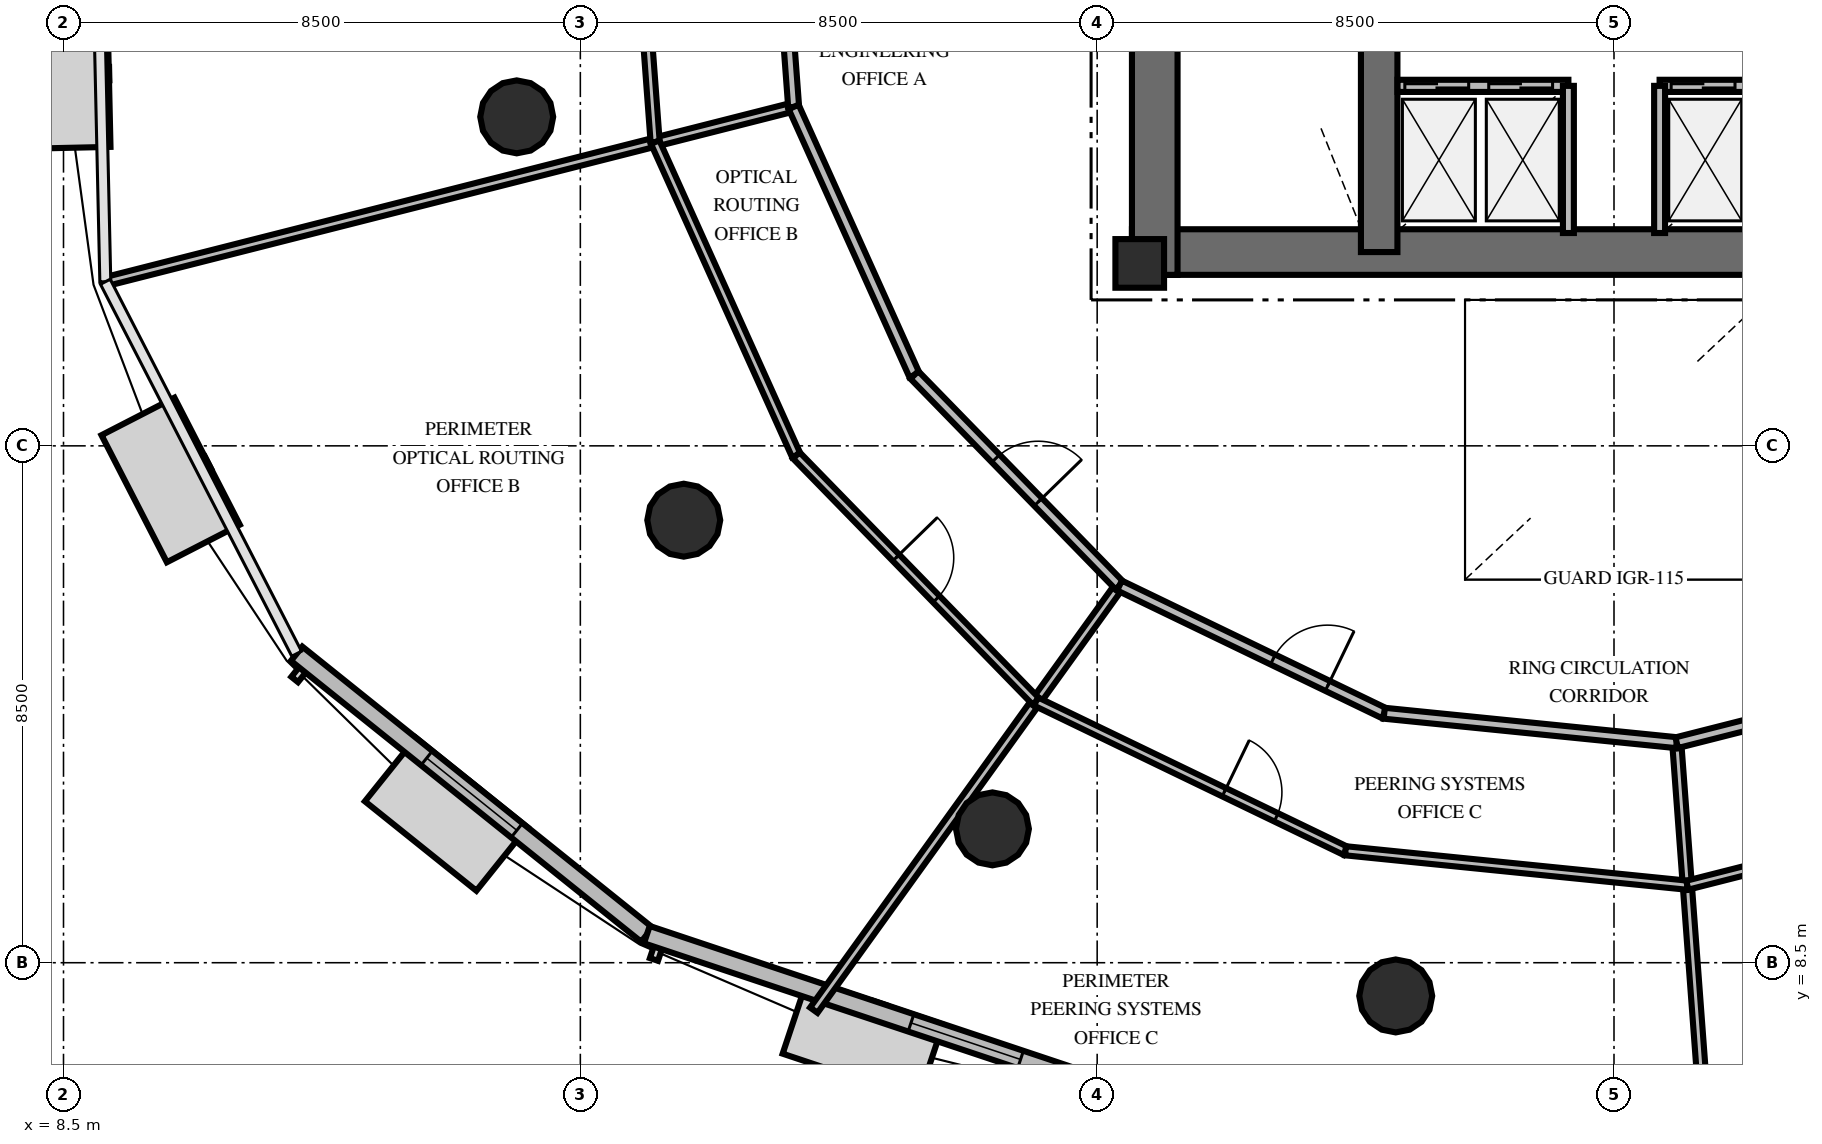
"""IFC4 building model, lengths in metres.
Left out: names, types, materials, properties, quantities, classifications, styles, units other than length and angle.
Written with IfcOpenShell. Run it as: python <this file> out.ifc"""

import sys

from ifc_helpers import new_model, si_unit, direction, frame, frame_2d, origin, origin_2d, place, context, subcontext, project, spatial, rectangle, circle, extrude, element, fill, save


model = new_model("IFC4")
c1 = context("Model", 3, precision=1e-05, world=origin(), true_north=direction((0.0, 1.0)))
c2 = subcontext(c1, "Body", "Model", "MODEL_VIEW")
j1 = project(units=[si_unit("LENGTHUNIT", "METRE"), si_unit("PLANEANGLEUNIT", "RADIAN")], contexts=[c1])
p1 = place(None, origin())
s1 = spatial("IfcSite", under=j1, at=p1, CompositionType="ELEMENT")
p2 = place(p1, origin())
s2 = spatial("IfcBuilding", under=s1, at=p2, CompositionType="ELEMENT")
p3 = place(p2, frame((0.0, 0.0, 93.8)))
s3 = spatial("IfcBuildingStorey", under=s2, at=p3, CompositionType="ELEMENT", Elevation=93.8)
p4 = place(p3, frame((26.072, 20.187, 0.0), z_axis=(0.0, 0.0, 1.0), x_axis=(1.0, 0.0, 0.0)))
e1 = element("IfcWall", 1, at=p4, inside=s3, PredefinedType="SHEAR", context=c2, shape_type="SweptSolid", body=[
    extrude(rectangle(XDim=15.866, YDim=0.75, at=frame_2d((7.933, 0.0))), origin(), (0.0, 0.0, 1.0), 4.0),
])
p5 = place(p3, frame((26.447, 19.812, 0.0), z_axis=(0.0, 0.0, 1.0), x_axis=(0.0, 1.0, 0.0)))
e2 = element("IfcWall", 2, at=p5, inside=s3, PredefinedType="SHEAR", context=c2, shape_type="SweptSolid", body=[
    extrude(rectangle(XDim=10.576, YDim=0.75, at=frame_2d((5.288, 0.0))), origin(), (0.0, 0.0, 1.0), 4.0),
])
p6 = place(p3, frame((30.138, 20.187, 0.0), z_axis=(0.0, 0.0, 1.0), x_axis=(0.0, 1.0, 0.0)))
e3 = element("IfcWall", 3, at=p6, inside=s3, PredefinedType="SHEAR", context=c2, shape_type="SweptSolid", body=[
    extrude(rectangle(XDim=9.826, YDim=0.6, at=frame_2d((4.913, 0.0))), origin(), (0.0, 0.0, 1.0), 4.0),
])
p7 = place(p3, frame((26.2, 20.0, 0.0), z_axis=(0.0, 0.0, 1.0), x_axis=(1.0, 0.0, 0.0)))
e4 = element("IfcColumn", 4, at=p7, inside=s3, PredefinedType="PILASTER", context=c2, shape_type="SweptSolid", body=[
    extrude(rectangle(XDim=0.8, YDim=0.8, at=origin_2d()), origin(), (0.0, 0.0, 1.0), 4.0),
])
for number, where, z_axis, x_axis in (
    (5, (15.954, 22.41, -0.28), (0.0, 0.0, 1.0), (1.0, 0.0, 0.0)),
    (6, (18.701, 15.778, -0.28), (0.0, 0.0, 1.0), (1.0, 0.0, 0.0)),
    (7, (23.778, 10.701, -0.28), (0.0, 0.0, 1.0), (1.0, 0.0, 0.0)),
    (8, (30.41, 7.954, -0.28), (0.0, 0.0, 1.0), (1.0, 0.0, 0.0)),
):
    element("IfcColumn", number, at=place(p3, frame(where, z_axis=z_axis, x_axis=x_axis)), inside=s3, PredefinedType="COLUMN", context=c2, shape_type="SweptSolid", body=[
        extrude(circle(Radius=0.6, at=origin_2d()), origin(), (0.0, 0.0, 1.0), 4.28),
    ])
p8 = place(p3, frame((12.334, 13.581, 0.0), z_axis=(0.0, 0.0, 1.0), x_axis=(0.780103663784, -0.625650280708, 0.0)))
e9 = element("IfcWall", 9, at=p8, inside=s3, PredefinedType="SOLIDWALL", context=c2, shape_type="SweptSolid", body=[
    extrude(rectangle(XDim=7.383, YDim=0.3, at=frame_2d((3.692, 0.0))), origin(), (0.0, 0.0, 1.0), 2.9),
])
p9 = place(p8, frame((2.742, 0.0, 0.8)))
e10 = element("IfcOpeningElement", 10, at=p9, cuts=e9, PredefinedType="OPENING", context=c2, shape_type="SweptSolid", body=[
    extrude(rectangle(XDim=1.9, YDim=1.95, at=frame_2d((0.95, 0.975))), frame((0.0, 0.16, 0.0), z_axis=(0.0, -1.0, 0.0), x_axis=(1.0, 0.0, 0.0)), (0.0, 0.0, 1.0), 0.32),
])
p10 = place(p3, frame((18.094, 8.962, 0.0), z_axis=(0.0, 0.0, 1.0), x_axis=(0.948496147273, -0.316788665531, 0.0)))
e11 = element("IfcWall", 11, at=p10, inside=s3, PredefinedType="SOLIDWALL", context=c2, shape_type="SweptSolid", body=[
    extrude(rectangle(XDim=8.095, YDim=0.3, at=frame_2d((4.048, 0.0))), origin(), (0.0, 0.0, 1.0), 2.9),
])
p11 = place(p10, frame((4.58, 0.0, 0.8)))
e12 = element("IfcOpeningElement", 12, at=p11, cuts=e11, PredefinedType="OPENING", context=c2, shape_type="SweptSolid", body=[
    extrude(rectangle(XDim=1.9, YDim=1.95, at=frame_2d((0.95, 0.975))), frame((0.0, 0.16, 0.0), z_axis=(0.0, -1.0, 0.0), x_axis=(1.0, 0.0, 0.0)), (0.0, 0.0, 1.0), 0.32),
])
p12 = place(p3, frame((34.443, 6.198, 0.0), z_axis=(0.0, 0.0, 1.0), x_axis=(0.969231185193, 0.246152208297, 0.0)))
e13 = element("IfcWall", 13, at=p12, inside=s3, PredefinedType="SOLIDWALL", context=c2, shape_type="SweptSolid", body=[
    extrude(rectangle(XDim=8.891, YDim=0.3, at=frame_2d((4.445, 0.0))), origin(), (0.0, 0.0, 1.0), 2.9),
])
p13 = place(p12, frame((6.75, 0.0, 0.0)))
e14 = element("IfcOpeningElement", 14, at=p13, cuts=e13, PredefinedType="OPENING", context=c2, shape_type="SweptSolid", body=[
    extrude(rectangle(XDim=1.05, YDim=2.15, at=frame_2d((0.525, 1.075))), frame((0.0, 0.16, 0.0), z_axis=(0.0, -1.0, 0.0), x_axis=(1.0, 0.0, 0.0)), (0.0, 0.0, 1.0), 0.32),
])
p14 = place(p3, frame((30.44, 22.92, 0.0), z_axis=(0.0, 0.0, 1.0), x_axis=(1.0, 0.0, 0.0)))
e15 = element("IfcWall", 15, at=p14, inside=s3, PredefinedType="SOLIDWALL", context=c2, shape_type="SweptSolid", body=[
    extrude(rectangle(XDim=2.81, YDim=0.2, at=frame_2d((1.405, 0.0))), origin(), (0.0, 0.0, 1.0), 2.8),
])
p15 = place(p14, frame((0.12, 0.0, 0.0)))
e16 = element("IfcOpeningElement", 16, at=p15, cuts=e15, PredefinedType="OPENING", context=c2, shape_type="SweptSolid", body=[
    extrude(rectangle(XDim=1.05, YDim=2.1, at=frame_2d((0.525, 1.05))), frame((0.0, 0.11, 0.0), z_axis=(0.0, -1.0, 0.0), x_axis=(1.0, 0.0, 0.0)), (0.0, 0.0, 1.0), 0.22),
])
p16 = place(p14, frame((1.5, 0.0, 0.0)))
e17 = element("IfcOpeningElement", 17, at=p16, cuts=e15, PredefinedType="OPENING", context=c2, shape_type="SweptSolid", body=[
    extrude(rectangle(XDim=1.05, YDim=2.1, at=frame_2d((0.525, 1.05))), frame((0.0, 0.11, 0.0), z_axis=(0.0, -1.0, 0.0), x_axis=(1.0, 0.0, 0.0)), (0.0, 0.0, 1.0), 0.22),
])
p17 = place(p3, frame((33.25, 20.5, 0.0), z_axis=(0.0, 0.0, 1.0), x_axis=(0.0, 1.0, 0.0)))
e18 = element("IfcWall", 18, at=p17, inside=s3, PredefinedType="SOLIDWALL", context=c2, shape_type="SweptSolid", body=[
    extrude(rectangle(XDim=2.42, YDim=0.18, at=frame_2d((1.21, 0.0))), origin(), (0.0, 0.0, 1.0), 2.8),
])
p18 = place(p3, frame((34.75, 22.92, 0.0), z_axis=(0.0, 0.0, 1.0), x_axis=(1.0, 0.0, 0.0)))
e19 = element("IfcWall", 19, at=p18, inside=s3, PredefinedType="SOLIDWALL", context=c2, shape_type="SweptSolid", body=[
    extrude(rectangle(XDim=2.81, YDim=0.2, at=frame_2d((1.405, 0.0))), origin(), (0.0, 0.0, 1.0), 2.8),
])
p19 = place(p18, frame((0.19, 0.0, 0.0)))
e20 = element("IfcOpeningElement", 20, at=p19, cuts=e19, PredefinedType="OPENING", context=c2, shape_type="SweptSolid", body=[
    extrude(rectangle(XDim=1.05, YDim=2.1, at=frame_2d((0.525, 1.05))), frame((0.0, 0.11, 0.0), z_axis=(0.0, -1.0, 0.0), x_axis=(1.0, 0.0, 0.0)), (0.0, 0.0, 1.0), 0.22),
])
p20 = place(p18, frame((1.57, 0.0, 0.0)))
e21 = element("IfcOpeningElement", 21, at=p20, cuts=e19, PredefinedType="OPENING", context=c2, shape_type="SweptSolid", body=[
    extrude(rectangle(XDim=1.05, YDim=2.1, at=frame_2d((0.525, 1.05))), frame((0.0, 0.11, 0.0), z_axis=(0.0, -1.0, 0.0), x_axis=(1.0, 0.0, 0.0)), (0.0, 0.0, 1.0), 0.22),
])
p21 = place(p3, frame((34.75, 20.5, 0.0), z_axis=(0.0, 0.0, 1.0), x_axis=(0.0, 1.0, 0.0)))
e22 = element("IfcWall", 22, at=p21, inside=s3, PredefinedType="SOLIDWALL", context=c2, shape_type="SweptSolid", body=[
    extrude(rectangle(XDim=2.42, YDim=0.18, at=frame_2d((1.21, 0.0))), origin(), (0.0, 0.0, 1.0), 2.8),
])
p22 = place(p3, frame((20.508, 22.573, 0.0), z_axis=(0.0, 0.0, 1.0), x_axis=(-0.969232035742, -0.246148859214, 0.0)))
e23 = element("IfcWall", 23, at=p22, inside=s3, PredefinedType="PARTITIONING", context=c2, shape_type="SweptSolid", body=[
    extrude(rectangle(XDim=11.68, YDim=0.15, at=frame_2d((5.84, 0.0))), origin(), (0.0, 0.0, 1.0), 2.8),
])
p23 = place(p3, frame((20.15, 27.395, 0.0), z_axis=(0.0, 0.0, 1.0), x_axis=(0.074135832701, -0.997248152823, 0.0)))
e24 = element("IfcWall", 24, at=p23, inside=s3, PredefinedType="PARTITIONING", context=c2, shape_type="SweptSolid", body=[
    extrude(rectangle(XDim=4.834, YDim=0.18, at=frame_2d((2.417, 0.0))), origin(), (0.0, 0.0, 1.0), 2.8),
])
p24 = place(p23, frame((1.034, 0.0, 0.0)))
e25 = element("IfcOpeningElement", 25, at=p24, cuts=e24, PredefinedType="OPENING", context=c2, shape_type="SweptSolid", body=[
    extrude(rectangle(XDim=1.0, YDim=2.15, at=frame_2d((0.5, 1.075))), frame((0.0, 0.1, 0.0), z_axis=(0.0, -1.0, 0.0), x_axis=(1.0, 0.0, 0.0)), (0.0, 0.0, 1.0), 0.2),
])
p25 = place(p3, frame((17.812, 27.63, 0.0), z_axis=(0.0, 0.0, 1.0), x_axis=(0.074099269637, -0.997250870262, 0.0)))
e26 = element("IfcWall", 26, at=p25, inside=s3, PredefinedType="PARTITIONING", context=c2, shape_type="SweptSolid", body=[
    extrude(rectangle(XDim=5.651, YDim=0.15, at=frame_2d((2.825, 0.0))), origin(), (0.0, 0.0, 1.0), 2.8),
])
p26 = place(p25, frame((1.265, 0.0, 0.0)))
e27 = element("IfcOpeningElement", 27, at=p26, cuts=e26, PredefinedType="OPENING", context=c2, shape_type="SweptSolid", body=[
    extrude(rectangle(XDim=0.95, YDim=2.15, at=frame_2d((0.475, 1.075))), frame((0.0, 0.085, 0.0), z_axis=(0.0, -1.0, 0.0), x_axis=(1.0, 0.0, 0.0)), (0.0, 0.0, 1.0), 0.17),
])
p27 = place(p3, frame((25.867, 14.703, 0.0), z_axis=(0.0, 0.0, 1.0), x_axis=(-0.584250909088, -0.811573086808, 0.0)))
e28 = element("IfcWall", 28, at=p27, inside=s3, PredefinedType="PARTITIONING", context=c2, shape_type="SweptSolid", body=[
    extrude(rectangle(XDim=8.605, YDim=0.15, at=frame_2d((4.302, 0.0))), origin(), (0.0, 0.0, 1.0), 2.8),
])
p28 = place(p3, frame((20.508, 22.573, 0.0), z_axis=(0.0, 0.0, 1.0), x_axis=(0.410730020243, -0.911757012845, 0.0)))
e29 = element("IfcWall", 29, at=p28, inside=s3, PredefinedType="PARTITIONING", context=c2, shape_type="SweptSolid", body=[
    extrude(rectangle(XDim=4.834, YDim=0.18, at=frame_2d((2.417, 0.0))), origin(), (0.0, 0.0, 1.0), 2.8),
])
p29 = place(p3, frame((22.494, 18.166, 0.0), z_axis=(0.0, 0.0, 1.0), x_axis=(0.697779031199, -0.716313076538, 0.0)))
e30 = element("IfcWall", 30, at=p29, inside=s3, PredefinedType="PARTITIONING", context=c2, shape_type="SweptSolid", body=[
    extrude(rectangle(XDim=4.834, YDim=0.18, at=frame_2d((2.417, 0.0))), origin(), (0.0, 0.0, 1.0), 2.8),
])
p30 = place(p29, frame((1.917, 0.0, 0.0)))
e31 = element("IfcOpeningElement", 31, at=p30, cuts=e30, PredefinedType="OPENING", context=c2, shape_type="SweptSolid", body=[
    extrude(rectangle(XDim=1.0, YDim=2.15, at=frame_2d((0.5, 1.075))), frame((0.0, 0.1, 0.0), z_axis=(0.0, -1.0, 0.0), x_axis=(1.0, 0.0, 0.0)), (0.0, 0.0, 1.0), 0.2),
])
p31 = place(p3, frame((18.231, 21.995, 0.0), z_axis=(0.0, 0.0, 1.0), x_axis=(0.4107275493, -0.911758125955, 0.0)))
e32 = element("IfcWall", 32, at=p31, inside=s3, PredefinedType="PARTITIONING", context=c2, shape_type="SweptSolid", body=[
    extrude(rectangle(XDim=5.65, YDim=0.15, at=frame_2d((2.825, 0.0))), origin(), (0.0, 0.0, 1.0), 2.8),
])
p32 = place(p3, frame((20.552, 16.843, 0.0), z_axis=(0.0, 0.0, 1.0), x_axis=(0.697778338801, -0.71631375102, 0.0)))
e33 = element("IfcWall", 33, at=p32, inside=s3, PredefinedType="PARTITIONING", context=c2, shape_type="SweptSolid", body=[
    extrude(rectangle(XDim=5.651, YDim=0.15, at=frame_2d((2.825, 0.0))), origin(), (0.0, 0.0, 1.0), 2.8),
])
p33 = place(p32, frame((2.35, 0.0, 0.0)))
e34 = element("IfcOpeningElement", 34, at=p33, cuts=e33, PredefinedType="OPENING", context=c2, shape_type="SweptSolid", body=[
    extrude(rectangle(XDim=0.95, YDim=2.15, at=frame_2d((0.475, 1.075))), frame((0.0, 0.085, 0.0), z_axis=(0.0, -1.0, 0.0), x_axis=(1.0, 0.0, 0.0)), (0.0, 0.0, 1.0), 0.17),
])
p34 = place(p3, frame((35.031, 12.118, 0.0), z_axis=(0.0, 0.0, 1.0), x_axis=(0.074122710033, -0.997249128281, 0.0)))
e35 = element("IfcWall", 35, at=p34, inside=s3, PredefinedType="PARTITIONING", context=c2, shape_type="SweptSolid", body=[
    extrude(rectangle(XDim=5.803, YDim=0.15, at=frame_2d((2.902, 0.0))), origin(), (0.0, 0.0, 1.0), 2.8),
])
p35 = place(p3, frame((25.867, 14.703, 0.0), z_axis=(0.0, 0.0, 1.0), x_axis=(0.900689994379, -0.434462350527, 0.0)))
e36 = element("IfcWall", 36, at=p35, inside=s3, PredefinedType="PARTITIONING", context=c2, shape_type="SweptSolid", body=[
    extrude(rectangle(XDim=4.834, YDim=0.18, at=frame_2d((2.417, 0.0))), origin(), (0.0, 0.0, 1.0), 2.8),
])
p36 = place(p35, frame((2.801, 0.0, 0.0)))
e37 = element("IfcOpeningElement", 37, at=p36, cuts=e36, PredefinedType="OPENING", context=c2, shape_type="SweptSolid", body=[
    extrude(rectangle(XDim=1.0, YDim=2.15, at=frame_2d((0.5, 1.075))), frame((0.0, 0.1, 0.0), z_axis=(0.0, -1.0, 0.0), x_axis=(1.0, 0.0, 0.0)), (0.0, 0.0, 1.0), 0.2),
])
p37 = place(p3, frame((30.221, 12.603, 0.0), z_axis=(0.0, 0.0, 1.0), x_axis=(0.994972982965, -0.100143712578, 0.0)))
e38 = element("IfcWall", 38, at=p37, inside=s3, PredefinedType="PARTITIONING", context=c2, shape_type="SweptSolid", body=[
    extrude(rectangle(XDim=4.834, YDim=0.18, at=frame_2d((2.417, 0.0))), origin(), (0.0, 0.0, 1.0), 2.8),
])
p38 = place(p3, frame((24.494, 12.796, 0.0), z_axis=(0.0, 0.0, 1.0), x_axis=(0.900696832222, -0.434448174614, 0.0)))
e39 = element("IfcWall", 39, at=p38, inside=s3, PredefinedType="PARTITIONING", context=c2, shape_type="SweptSolid", body=[
    extrude(rectangle(XDim=5.65, YDim=0.15, at=frame_2d((2.825, 0.0))), origin(), (0.0, 0.0, 1.0), 2.8),
])
p39 = place(p38, frame((3.435, 0.0, 0.0)))
e40 = element("IfcOpeningElement", 40, at=p39, cuts=e39, PredefinedType="OPENING", context=c2, shape_type="SweptSolid", body=[
    extrude(rectangle(XDim=0.95, YDim=2.15, at=frame_2d((0.475, 1.075))), frame((0.0, 0.085, 0.0), z_axis=(0.0, -1.0, 0.0), x_axis=(1.0, 0.0, 0.0)), (0.0, 0.0, 1.0), 0.17),
])
p40 = place(p3, frame((29.584, 10.341, 0.0), z_axis=(0.0, 0.0, 1.0), x_axis=(0.994967646776, -0.100196715862, 0.0)))
e41 = element("IfcWall", 41, at=p40, inside=s3, PredefinedType="PARTITIONING", context=c2, shape_type="SweptSolid", body=[
    extrude(rectangle(XDim=5.65, YDim=0.15, at=frame_2d((2.825, 0.0))), origin(), (0.0, 0.0, 1.0), 2.8),
])
p41 = place(p3, frame((35.031, 12.118, 0.0), z_axis=(0.0, 0.0, 1.0), x_axis=(0.969235741286, 0.246134267859, 0.0)))
e42 = element("IfcWall", 42, at=p41, inside=s3, PredefinedType="PARTITIONING", context=c2, shape_type="SweptSolid", body=[
    extrude(rectangle(XDim=4.834, YDim=0.18, at=frame_2d((2.417, 0.0))), origin(), (0.0, 0.0, 1.0), 2.8),
])
p42 = place(p41, frame((2.801, 0.0, 0.0)))
e43 = element("IfcOpeningElement", 43, at=p42, cuts=e42, PredefinedType="OPENING", context=c2, shape_type="SweptSolid", body=[
    extrude(rectangle(XDim=1.0, YDim=2.15, at=frame_2d((0.5, 1.075))), frame((0.0, 0.1, 0.0), z_axis=(0.0, -1.0, 0.0), x_axis=(1.0, 0.0, 0.0)), (0.0, 0.0, 1.0), 0.2),
])
p43 = place(p3, frame((35.206, 9.775, 0.0), z_axis=(0.0, 0.0, 1.0), x_axis=(0.969230932857, 0.246153201876, 0.0)))
e44 = element("IfcWall", 44, at=p43, inside=s3, PredefinedType="PARTITIONING", context=c2, shape_type="SweptSolid", body=[
    extrude(rectangle(XDim=5.65, YDim=0.15, at=frame_2d((2.825, 0.0))), origin(), (0.0, 0.0, 1.0), 2.8),
])
p44 = place(p43, frame((3.435, 0.0, 0.0)))
e45 = element("IfcOpeningElement", 45, at=p44, cuts=e44, PredefinedType="OPENING", context=c2, shape_type="SweptSolid", body=[
    extrude(rectangle(XDim=0.95, YDim=2.15, at=frame_2d((0.475, 1.075))), frame((0.0, 0.085, 0.0), z_axis=(0.0, -1.0, 0.0), x_axis=(1.0, 0.0, 0.0)), (0.0, 0.0, 1.0), 0.17),
])
p45 = place(p9, origin())
e46 = element("IfcWindow", 46, at=p45, inside=s3, PartitioningType="SINGLE_PANEL", PredefinedType="WINDOW", context=c2, shape_type="SweptSolid", body=[
    extrude(rectangle(XDim=1.9, YDim=1.95, at=frame_2d((0.95, 0.975))), frame((0.0, 0.03, 0.0), z_axis=(0.0, -1.0, 0.0), x_axis=(1.0, 0.0, 0.0)), (0.0, 0.0, 1.0), 0.06),
])
fill(e10, e46)
p46 = place(p11, origin())
e47 = element("IfcWindow", 47, at=p46, inside=s3, PartitioningType="SINGLE_PANEL", PredefinedType="WINDOW", context=c2, shape_type="SweptSolid", body=[
    extrude(rectangle(XDim=1.9, YDim=1.95, at=frame_2d((0.95, 0.975))), frame((0.0, 0.03, 0.0), z_axis=(0.0, -1.0, 0.0), x_axis=(1.0, 0.0, 0.0)), (0.0, 0.0, 1.0), 0.06),
])
fill(e12, e47)
p47 = place(p15, origin())
e48 = element("IfcDoor", 48, at=p47, inside=s3, OperationType="DOUBLE_DOOR_SLIDING", PredefinedType="USERDEFINED", context=c2, shape_type="SweptSolid", body=[
    extrude(rectangle(XDim=1.05, YDim=2.1, at=frame_2d((0.525, 1.05))), frame((0.0, 0.025, 0.0), z_axis=(0.0, -1.0, 0.0), x_axis=(1.0, 0.0, 0.0)), (0.0, 0.0, 1.0), 0.05),
])
fill(e16, e48)
p48 = place(p16, origin())
e49 = element("IfcDoor", 49, at=p48, inside=s3, OperationType="DOUBLE_DOOR_SLIDING", PredefinedType="USERDEFINED", context=c2, shape_type="SweptSolid", body=[
    extrude(rectangle(XDim=1.05, YDim=2.1, at=frame_2d((0.525, 1.05))), frame((0.0, 0.025, 0.0), z_axis=(0.0, -1.0, 0.0), x_axis=(1.0, 0.0, 0.0)), (0.0, 0.0, 1.0), 0.05),
])
fill(e17, e49)
p49 = place(p19, origin())
e50 = element("IfcDoor", 50, at=p49, inside=s3, OperationType="DOUBLE_DOOR_SLIDING", PredefinedType="USERDEFINED", context=c2, shape_type="SweptSolid", body=[
    extrude(rectangle(XDim=1.05, YDim=2.1, at=frame_2d((0.525, 1.05))), frame((0.0, 0.025, 0.0), z_axis=(0.0, -1.0, 0.0), x_axis=(1.0, 0.0, 0.0)), (0.0, 0.0, 1.0), 0.05),
])
fill(e20, e50)
p50 = place(p30, origin())
e51 = element("IfcDoor", 51, at=p50, inside=s3, OperationType="SINGLE_SWING_RIGHT", PredefinedType="DOOR", context=c2, shape_type="SweptSolid", body=[
    extrude(rectangle(XDim=1.0, YDim=2.15, at=frame_2d((0.5, 1.075))), frame((0.0, 0.025, 0.0), z_axis=(0.0, -1.0, 0.0), x_axis=(1.0, 0.0, 0.0)), (0.0, 0.0, 1.0), 0.05),
])
fill(e31, e51)
p51 = place(p33, origin())
e52 = element("IfcDoor", 52, at=p51, inside=s3, OperationType="SINGLE_SWING_LEFT", PredefinedType="DOOR", context=c2, shape_type="SweptSolid", body=[
    extrude(rectangle(XDim=0.95, YDim=2.15, at=frame_2d((0.475, 1.075))), frame((0.0, 0.025, 0.0), z_axis=(0.0, -1.0, 0.0), x_axis=(1.0, 0.0, 0.0)), (0.0, 0.0, 1.0), 0.05),
])
fill(e34, e52)
p52 = place(p36, origin())
e53 = element("IfcDoor", 53, at=p52, inside=s3, OperationType="SINGLE_SWING_RIGHT", PredefinedType="DOOR", context=c2, shape_type="SweptSolid", body=[
    extrude(rectangle(XDim=1.0, YDim=2.15, at=frame_2d((0.5, 1.075))), frame((0.0, 0.025, 0.0), z_axis=(0.0, -1.0, 0.0), x_axis=(1.0, 0.0, 0.0)), (0.0, 0.0, 1.0), 0.05),
])
fill(e37, e53)
p53 = place(p39, origin())
e54 = element("IfcDoor", 54, at=p53, inside=s3, OperationType="SINGLE_SWING_LEFT", PredefinedType="DOOR", context=c2, shape_type="SweptSolid", body=[
    extrude(rectangle(XDim=0.95, YDim=2.15, at=frame_2d((0.475, 1.075))), frame((0.0, 0.025, 0.0), z_axis=(0.0, -1.0, 0.0), x_axis=(1.0, 0.0, 0.0)), (0.0, 0.0, 1.0), 0.05),
])
fill(e40, e54)
save(model, sys.argv[1])
